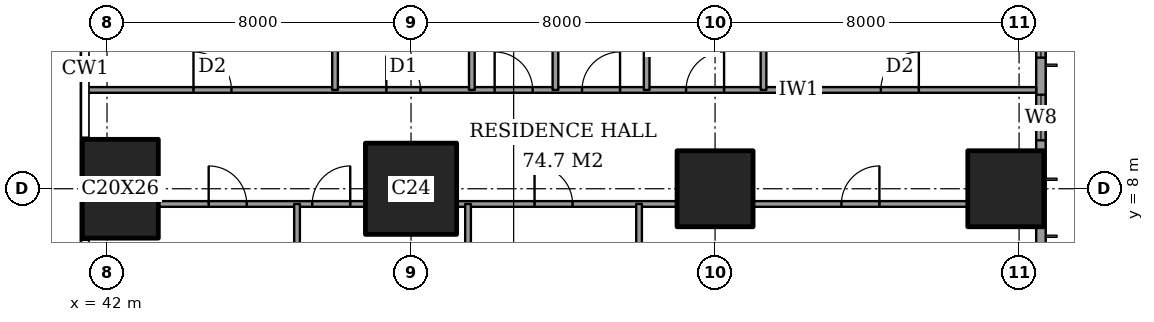
"""IFC4 building model, lengths in metres.
Left out: names, types, materials, properties, quantities, classifications, styles, units other than length and angle.
Written with IfcOpenShell. Run it as: python <this file> out.ifc"""

import sys

from ifc_helpers import new_model, si_unit, direction, frame, frame_2d, origin, origin_2d, place, context, subcontext, project, spatial, rectangle, extrude, element, fill, save


model = new_model("IFC4")
c1 = context("Model", 3, precision=1e-05, world=origin(), true_north=direction((0.0, 1.0)))
c2 = subcontext(c1, "Body", "Model", "MODEL_VIEW")
j1 = project(units=[si_unit("LENGTHUNIT", "METRE"), si_unit("PLANEANGLEUNIT", "RADIAN")], contexts=[c1])
p1 = place(None, origin())
s1 = spatial("IfcSite", under=j1, at=p1, CompositionType="ELEMENT")
p2 = place(p1, origin())
s2 = spatial("IfcBuilding", under=s1, at=p2, CompositionType="ELEMENT")
p3 = place(p2, frame((0.0, 0.0, 44.0)))
s3 = spatial("IfcBuildingStorey", under=s2, at=p3, CompositionType="ELEMENT", Elevation=44.0)
p4 = place(p3, frame((42.35, 8.0, 0.0), z_axis=(0.0, 0.0, 1.0), x_axis=(1.0, 0.0, 0.0)))
e1 = element("IfcColumn", 1, at=p4, inside=s3, PredefinedType="COLUMN", context=c2, shape_type="SweptSolid", body=[
    extrude(rectangle(XDim=2.0, YDim=2.6, at=origin_2d()), origin(), (0.0, 0.0, 1.0), 3.6),
])
p5 = place(p3, frame((50.0, 8.0, 0.0), z_axis=(0.0, 0.0, 1.0), x_axis=(1.0, 0.0, 0.0)))
e2 = element("IfcColumn", 2, at=p5, inside=s3, PredefinedType="COLUMN", context=c2, shape_type="SweptSolid", body=[
    extrude(rectangle(XDim=2.4, YDim=2.4, at=origin_2d()), origin(), (0.0, 0.0, 1.0), 3.6),
])
for number, where, z_axis, x_axis in (
    (3, (58.0, 8.0, 0.0), (0.0, 0.0, 1.0), (1.0, 0.0, 0.0)),
    (4, (65.65, 8.0, 0.0), (0.0, 0.0, 1.0), (1.0, 0.0, 0.0)),
):
    element("IfcColumn", number, at=place(p3, frame(where, z_axis=z_axis, x_axis=x_axis)), inside=s3, PredefinedType="COLUMN", context=c2, shape_type="SweptSolid", body=[
        extrude(rectangle(XDim=2.0, YDim=2.0, at=origin_2d()), origin(), (0.0, 0.0, 1.0), 3.6),
    ])
p6 = place(p3, frame((66.575, 3.175, 0.0), z_axis=(0.0, 0.0, 1.0), x_axis=(0.0, 1.0, 0.0)))
e5 = element("IfcWall", 5, at=p6, inside=s3, PredefinedType="SOLIDWALL", context=c2, shape_type="SweptSolid", body=[
    extrude(rectangle(XDim=41.65, YDim=0.25, at=frame_2d((20.825, 0.0))), origin(), (0.0, 0.0, 1.0), 3.6),
])
p7 = place(p6, frame((0.775, 0.0, 0.6)))
e6 = element("IfcOpeningElement", 6, at=p7, cuts=e5, PredefinedType="OPENING", context=c2, shape_type="SweptSolid", body=[
    extrude(rectangle(XDim=2.4, YDim=2.0, at=frame_2d((1.2, 1.0))), frame((0.0, 0.135, 0.0), z_axis=(0.0, -1.0, 0.0), x_axis=(1.0, 0.0, 0.0)), (0.0, 0.0, 1.0), 0.27),
])
p8 = place(p6, frame((6.1, 0.0, 0.6)))
e7 = element("IfcOpeningElement", 7, at=p8, cuts=e5, PredefinedType="OPENING", context=c2, shape_type="SweptSolid", body=[
    extrude(rectangle(XDim=1.2, YDim=2.0, at=frame_2d((0.6, 1.0))), frame((0.0, 0.135, 0.0), z_axis=(0.0, -1.0, 0.0), x_axis=(1.0, 0.0, 0.0)), (0.0, 0.0, 1.0), 0.27),
])
p9 = place(p6, frame((8.275, 0.0, 0.6)))
e8 = element("IfcOpeningElement", 8, at=p9, cuts=e5, PredefinedType="OPENING", context=c2, shape_type="SweptSolid", body=[
    extrude(rectangle(XDim=2.4, YDim=2.0, at=frame_2d((1.2, 1.0))), frame((0.0, 0.135, 0.0), z_axis=(0.0, -1.0, 0.0), x_axis=(1.0, 0.0, 0.0)), (0.0, 0.0, 1.0), 0.27),
])
p10 = place(p6, frame((15.775, 0.0, 0.6)))
e9 = element("IfcOpeningElement", 9, at=p10, cuts=e5, PredefinedType="OPENING", context=c2, shape_type="SweptSolid", body=[
    extrude(rectangle(XDim=2.4, YDim=2.0, at=frame_2d((1.2, 1.0))), frame((0.0, 0.135, 0.0), z_axis=(0.0, -1.0, 0.0), x_axis=(1.0, 0.0, 0.0)), (0.0, 0.0, 1.0), 0.27),
])
p11 = place(p6, frame((23.475, 0.0, 0.6)))
e10 = element("IfcOpeningElement", 10, at=p11, cuts=e5, PredefinedType="OPENING", context=c2, shape_type="SweptSolid", body=[
    extrude(rectangle(XDim=2.4, YDim=2.0, at=frame_2d((1.2, 1.0))), frame((0.0, 0.135, 0.0), z_axis=(0.0, -1.0, 0.0), x_axis=(1.0, 0.0, 0.0)), (0.0, 0.0, 1.0), 0.27),
])
p12 = place(p6, frame((30.975, 0.0, 0.6)))
e11 = element("IfcOpeningElement", 11, at=p12, cuts=e5, PredefinedType="OPENING", context=c2, shape_type="SweptSolid", body=[
    extrude(rectangle(XDim=2.4, YDim=2.0, at=frame_2d((1.2, 1.0))), frame((0.0, 0.135, 0.0), z_axis=(0.0, -1.0, 0.0), x_axis=(1.0, 0.0, 0.0)), (0.0, 0.0, 1.0), 0.27),
])
p13 = place(p6, frame((34.5, 0.0, 0.6)))
e12 = element("IfcOpeningElement", 12, at=p13, cuts=e5, PredefinedType="OPENING", context=c2, shape_type="SweptSolid", body=[
    extrude(rectangle(XDim=1.2, YDim=2.0, at=frame_2d((0.6, 1.0))), frame((0.0, 0.135, 0.0), z_axis=(0.0, -1.0, 0.0), x_axis=(1.0, 0.0, 0.0)), (0.0, 0.0, 1.0), 0.27),
])
p14 = place(p6, frame((38.475, 0.0, 0.6)))
e13 = element("IfcOpeningElement", 13, at=p14, cuts=e5, PredefinedType="OPENING", context=c2, shape_type="SweptSolid", body=[
    extrude(rectangle(XDim=2.4, YDim=2.0, at=frame_2d((1.2, 1.0))), frame((0.0, 0.135, 0.0), z_axis=(0.0, -1.0, 0.0), x_axis=(1.0, 0.0, 0.0)), (0.0, 0.0, 1.0), 0.27),
])
p15 = place(p3, frame((43.35, 7.6, 0.0), z_axis=(0.0, 0.0, 1.0), x_axis=(1.0, 0.0, 0.0)))
e14 = element("IfcWall", 14, at=p15, inside=s3, PredefinedType="PARTITIONING", context=c2, shape_type="SweptSolid", body=[
    extrude(rectangle(XDim=5.45, YDim=0.15, at=frame_2d((2.725, 0.0))), origin(), (0.0, 0.0, 1.0), 3.35),
])
p16 = place(p15, frame((4.05, 0.0, 0.0)))
e15 = element("IfcOpeningElement", 15, at=p16, cuts=e14, PredefinedType="OPENING", context=c2, shape_type="SweptSolid", body=[
    extrude(rectangle(XDim=1.0, YDim=2.1, at=frame_2d((0.5, 1.05))), frame((0.0, 0.085, 0.0), z_axis=(0.0, -1.0, 0.0), x_axis=(1.0, 0.0, 0.0)), (0.0, 0.0, 1.0), 0.17),
])
p17 = place(p15, frame((1.325, 0.0, 0.0)))
e16 = element("IfcOpeningElement", 16, at=p17, cuts=e14, PredefinedType="OPENING", context=c2, shape_type="SweptSolid", body=[
    extrude(rectangle(XDim=1.0, YDim=2.1, at=frame_2d((0.5, 1.05))), frame((0.0, 0.085, 0.0), z_axis=(0.0, -1.0, 0.0), x_axis=(1.0, 0.0, 0.0)), (0.0, 0.0, 1.0), 0.17),
])
p18 = place(p3, frame((51.2, 7.6, 0.0), z_axis=(0.0, 0.0, 1.0), x_axis=(1.0, 0.0, 0.0)))
e17 = element("IfcWall", 17, at=p18, inside=s3, PredefinedType="PARTITIONING", context=c2, shape_type="SweptSolid", body=[
    extrude(rectangle(XDim=5.8, YDim=0.15, at=frame_2d((2.9, 0.0))), origin(), (0.0, 0.0, 1.0), 3.35),
])
p19 = place(p18, frame((2.05, 0.0, 0.0)))
e18 = element("IfcOpeningElement", 18, at=p19, cuts=e17, PredefinedType="OPENING", context=c2, shape_type="SweptSolid", body=[
    extrude(rectangle(XDim=1.0, YDim=2.1, at=frame_2d((0.5, 1.05))), frame((0.0, 0.085, 0.0), z_axis=(0.0, -1.0, 0.0), x_axis=(1.0, 0.0, 0.0)), (0.0, 0.0, 1.0), 0.17),
])
p20 = place(p3, frame((59.0, 7.6, 0.0), z_axis=(0.0, 0.0, 1.0), x_axis=(1.0, 0.0, 0.0)))
e19 = element("IfcWall", 19, at=p20, inside=s3, PredefinedType="PARTITIONING", context=c2, shape_type="SweptSolid", body=[
    extrude(rectangle(XDim=5.65, YDim=0.15, at=frame_2d((2.825, 0.0))), origin(), (0.0, 0.0, 1.0), 3.35),
])
p21 = place(p20, frame((2.325, 0.0, 0.0)))
e20 = element("IfcOpeningElement", 20, at=p21, cuts=e19, PredefinedType="OPENING", context=c2, shape_type="SweptSolid", body=[
    extrude(rectangle(XDim=1.0, YDim=2.1, at=frame_2d((0.5, 1.05))), frame((0.0, 0.085, 0.0), z_axis=(0.0, -1.0, 0.0), x_axis=(1.0, 0.0, 0.0)), (0.0, 0.0, 1.0), 0.17),
])
p22 = place(p3, frame((41.439, 10.6, 0.0), z_axis=(0.0, 0.0, 1.0), x_axis=(1.0, 0.0, 0.0)))
e21 = element("IfcWall", 21, at=p22, inside=s3, PredefinedType="PARTITIONING", context=c2, shape_type="SweptSolid", body=[
    extrude(rectangle(XDim=25.011, YDim=0.15, at=frame_2d((12.505, 0.0))), origin(), (0.0, 0.0, 1.0), 3.35),
])
p23 = place(p22, frame((10.761, 0.0, 0.0)))
e22 = element("IfcOpeningElement", 22, at=p23, cuts=e21, PredefinedType="OPENING", context=c2, shape_type="SweptSolid", body=[
    extrude(rectangle(XDim=1.0, YDim=2.1, at=frame_2d((0.5, 1.05))), frame((0.0, 0.085, 0.0), z_axis=(0.0, -1.0, 0.0), x_axis=(1.0, 0.0, 0.0)), (0.0, 0.0, 1.0), 0.17),
])
p24 = place(p22, frame((20.924, 0.0, 0.0)))
e23 = element("IfcOpeningElement", 23, at=p24, cuts=e21, PredefinedType="OPENING", context=c2, shape_type="SweptSolid", body=[
    extrude(rectangle(XDim=1.0, YDim=2.1, at=frame_2d((0.5, 1.05))), frame((0.0, 0.085, 0.0), z_axis=(0.0, -1.0, 0.0), x_axis=(1.0, 0.0, 0.0)), (0.0, 0.0, 1.0), 0.17),
])
p25 = place(p22, frame((15.799, 0.0, 0.0)))
e24 = element("IfcOpeningElement", 24, at=p25, cuts=e21, PredefinedType="OPENING", context=c2, shape_type="SweptSolid", body=[
    extrude(rectangle(XDim=1.0, YDim=2.1, at=frame_2d((0.5, 1.05))), frame((0.0, 0.085, 0.0), z_axis=(0.0, -1.0, 0.0), x_axis=(1.0, 0.0, 0.0)), (0.0, 0.0, 1.0), 0.17),
])
p26 = place(p22, frame((13.061, 0.0, 0.0)))
e25 = element("IfcOpeningElement", 25, at=p26, cuts=e21, PredefinedType="OPENING", context=c2, shape_type="SweptSolid", body=[
    extrude(rectangle(XDim=1.0, YDim=2.1, at=frame_2d((0.5, 1.05))), frame((0.0, 0.085, 0.0), z_axis=(0.0, -1.0, 0.0), x_axis=(1.0, 0.0, 0.0)), (0.0, 0.0, 1.0), 0.17),
])
p27 = place(p22, frame((7.911, 0.0, 0.0)))
e26 = element("IfcOpeningElement", 26, at=p27, cuts=e21, PredefinedType="OPENING", context=c2, shape_type="SweptSolid", body=[
    extrude(rectangle(XDim=0.9, YDim=2.1, at=frame_2d((0.45, 1.05))), frame((0.0, 0.085, 0.0), z_axis=(0.0, -1.0, 0.0), x_axis=(1.0, 0.0, 0.0)), (0.0, 0.0, 1.0), 0.17),
])
p28 = place(p22, frame((2.836, 0.0, 0.0)))
e27 = element("IfcOpeningElement", 27, at=p28, cuts=e21, PredefinedType="OPENING", context=c2, shape_type="SweptSolid", body=[
    extrude(rectangle(XDim=1.0, YDim=2.1, at=frame_2d((0.5, 1.05))), frame((0.0, 0.085, 0.0), z_axis=(0.0, -1.0, 0.0), x_axis=(1.0, 0.0, 0.0)), (0.0, 0.0, 1.0), 0.17),
])
p29 = place(p3, frame((47.0, -0.45, 0.0), z_axis=(0.0, 0.0, 1.0), x_axis=(0.0, 1.0, 0.0)))
e28 = element("IfcWall", 28, at=p29, inside=s3, PredefinedType="PARTITIONING", context=c2, shape_type="SweptSolid", body=[
    extrude(rectangle(XDim=8.05, YDim=0.15, at=frame_2d((4.025, 0.0))), origin(), (0.0, 0.0, 1.0), 3.35),
])
p30 = place(p3, frame((48.0, 10.6, 0.0), z_axis=(0.0, 0.0, 1.0), x_axis=(0.0, 1.0, 0.0)))
e29 = element("IfcWall", 29, at=p30, inside=s3, PredefinedType="PARTITIONING", context=c2, shape_type="SweptSolid", body=[
    extrude(rectangle(XDim=13.4, YDim=0.15, at=frame_2d((6.7, 0.0))), origin(), (0.0, 0.0, 1.0), 3.35),
])
p31 = place(p30, frame((10.8, 0.0, 0.0)))
e30 = element("IfcOpeningElement", 30, at=p31, cuts=e29, PredefinedType="OPENING", context=c2, shape_type="SweptSolid", body=[
    extrude(rectangle(XDim=1.2, YDim=2.4, at=frame_2d((0.6, 1.2))), frame((0.0, 0.085, 0.0), z_axis=(0.0, -1.0, 0.0), x_axis=(1.0, 0.0, 0.0)), (0.0, 0.0, 1.0), 0.17),
])
p32 = place(p30, frame((6.7, 0.0, 0.0)))
e31 = element("IfcOpeningElement", 31, at=p32, cuts=e29, PredefinedType="OPENING", context=c2, shape_type="SweptSolid", body=[
    extrude(rectangle(XDim=0.9, YDim=2.1, at=frame_2d((0.45, 1.05))), frame((0.0, 0.085, 0.0), z_axis=(0.0, -1.0, 0.0), x_axis=(1.0, 0.0, 0.0)), (0.0, 0.0, 1.0), 0.17),
])
p33 = place(p3, frame((51.5, -0.45, 0.0), z_axis=(0.0, 0.0, 1.0), x_axis=(0.0, 1.0, 0.0)))
e32 = element("IfcWall", 32, at=p33, inside=s3, PredefinedType="PARTITIONING", context=c2, shape_type="SweptSolid", body=[
    extrude(rectangle(XDim=8.05, YDim=0.15, at=frame_2d((4.025, 0.0))), origin(), (0.0, 0.0, 1.0), 3.35),
])
for number, where, z_axis, x_axis in (
    (33, (51.6, 10.6, 0.0), (0.0, 0.0, 1.0), (0.0, 1.0, 0.0)),
    (34, (53.8, 10.6, 0.0), (0.0, 0.0, 1.0), (0.0, 1.0, 0.0)),
):
    element("IfcWall", number, at=place(p3, frame(where, z_axis=z_axis, x_axis=x_axis)), inside=s3, PredefinedType="PARTITIONING", context=c2, shape_type="SweptSolid", body=[
        extrude(rectangle(XDim=4.0, YDim=0.15, at=frame_2d((2.0, 0.0))), origin(), (0.0, 0.0, 1.0), 3.35),
    ])
p34 = place(p3, frame((56.0, -0.45, 0.0), z_axis=(0.0, 0.0, 1.0), x_axis=(0.0, 1.0, 0.0)))
e35 = element("IfcWall", 35, at=p34, inside=s3, PredefinedType="PARTITIONING", context=c2, shape_type="SweptSolid", body=[
    extrude(rectangle(XDim=8.05, YDim=0.15, at=frame_2d((4.025, 0.0))), origin(), (0.0, 0.0, 1.0), 3.35),
])
p35 = place(p3, frame((56.2, 10.6, 0.0), z_axis=(0.0, 0.0, 1.0), x_axis=(0.0, 1.0, 0.0)))
e36 = element("IfcWall", 36, at=p35, inside=s3, PredefinedType="PARTITIONING", context=c2, shape_type="SweptSolid", body=[
    extrude(rectangle(XDim=11.0, YDim=0.15, at=frame_2d((5.5, 0.0))), origin(), (0.0, 0.0, 1.0), 3.35),
])
p36 = place(p35, frame((7.0, 0.0, 0.0)))
e37 = element("IfcOpeningElement", 37, at=p36, cuts=e36, PredefinedType="OPENING", context=c2, shape_type="SweptSolid", body=[
    extrude(rectangle(XDim=1.0, YDim=2.1, at=frame_2d((0.5, 1.05))), frame((0.0, 0.085, 0.0), z_axis=(0.0, -1.0, 0.0), x_axis=(1.0, 0.0, 0.0)), (0.0, 0.0, 1.0), 0.17),
])
p37 = place(p3, frame((59.275, 10.6, 0.0), z_axis=(0.0, 0.0, 1.0), x_axis=(0.0, 1.0, 0.0)))
e38 = element("IfcWall", 38, at=p37, inside=s3, PredefinedType="PARTITIONING", context=c2, shape_type="SweptSolid", body=[
    extrude(rectangle(XDim=4.2, YDim=0.15, at=frame_2d((2.1, 0.0))), origin(), (0.0, 0.0, 1.0), 3.35),
])
p38 = place(p8, origin())
e39 = element("IfcWindow", 39, at=p38, inside=s3, PartitioningType="SINGLE_PANEL", PredefinedType="WINDOW", context=c2, shape_type="SweptSolid", body=[
    extrude(rectangle(XDim=1.2, YDim=2.0, at=frame_2d((0.6, 1.0))), frame((0.0, 0.03, 0.0), z_axis=(0.0, -1.0, 0.0), x_axis=(1.0, 0.0, 0.0)), (0.0, 0.0, 1.0), 0.06),
])
fill(e7, e39)
p39 = place(p9, origin())
e40 = element("IfcWindow", 40, at=p39, inside=s3, PartitioningType="SINGLE_PANEL", PredefinedType="WINDOW", context=c2, shape_type="SweptSolid", body=[
    extrude(rectangle(XDim=2.4, YDim=2.0, at=frame_2d((1.2, 1.0))), frame((0.0, 0.03, 0.0), z_axis=(0.0, -1.0, 0.0), x_axis=(1.0, 0.0, 0.0)), (0.0, 0.0, 1.0), 0.06),
])
fill(e8, e40)
p40 = place(p21, origin())
e41 = element("IfcDoor", 41, at=p40, inside=s3, OperationType="SINGLE_SWING_LEFT", PredefinedType="DOOR", context=c2, shape_type="SweptSolid", body=[
    extrude(rectangle(XDim=1.0, YDim=2.1, at=frame_2d((0.5, 1.05))), frame((0.0, 0.025, 0.0), z_axis=(0.0, -1.0, 0.0), x_axis=(1.0, 0.0, 0.0)), (0.0, 0.0, 1.0), 0.05),
])
fill(e20, e41)
p41 = place(p19, origin())
e42 = element("IfcDoor", 42, at=p41, inside=s3, OperationType="SINGLE_SWING_RIGHT", PredefinedType="DOOR", context=c2, shape_type="SweptSolid", body=[
    extrude(rectangle(XDim=1.0, YDim=2.1, at=frame_2d((0.5, 1.05))), frame((0.0, 0.025, 0.0), z_axis=(0.0, -1.0, 0.0), x_axis=(1.0, 0.0, 0.0)), (0.0, 0.0, 1.0), 0.05),
])
fill(e18, e42)
p42 = place(p16, origin())
e43 = element("IfcDoor", 43, at=p42, inside=s3, OperationType="SINGLE_SWING_LEFT", PredefinedType="DOOR", context=c2, shape_type="SweptSolid", body=[
    extrude(rectangle(XDim=1.0, YDim=2.1, at=frame_2d((0.5, 1.05))), frame((0.0, 0.025, 0.0), z_axis=(0.0, -1.0, 0.0), x_axis=(1.0, 0.0, 0.0)), (0.0, 0.0, 1.0), 0.05),
])
fill(e15, e43)
p43 = place(p17, origin())
e44 = element("IfcDoor", 44, at=p43, inside=s3, OperationType="SINGLE_SWING_RIGHT", PredefinedType="DOOR", context=c2, shape_type="SweptSolid", body=[
    extrude(rectangle(XDim=1.0, YDim=2.1, at=frame_2d((0.5, 1.05))), frame((0.0, 0.025, 0.0), z_axis=(0.0, -1.0, 0.0), x_axis=(1.0, 0.0, 0.0)), (0.0, 0.0, 1.0), 0.05),
])
fill(e16, e44)
p44 = place(p23, origin())
e45 = element("IfcDoor", 45, at=p44, inside=s3, OperationType="SINGLE_SWING_RIGHT", PredefinedType="DOOR", context=c2, shape_type="SweptSolid", body=[
    extrude(rectangle(XDim=1.0, YDim=2.1, at=frame_2d((0.5, 1.05))), frame((0.0, 0.025, 0.0), z_axis=(0.0, -1.0, 0.0), x_axis=(1.0, 0.0, 0.0)), (0.0, 0.0, 1.0), 0.05),
])
fill(e22, e45)
p45 = place(p24, origin())
e46 = element("IfcDoor", 46, at=p45, inside=s3, OperationType="SINGLE_SWING_LEFT", PredefinedType="DOOR", context=c2, shape_type="SweptSolid", body=[
    extrude(rectangle(XDim=1.0, YDim=2.1, at=frame_2d((0.5, 1.05))), frame((0.0, 0.025, 0.0), z_axis=(0.0, -1.0, 0.0), x_axis=(1.0, 0.0, 0.0)), (0.0, 0.0, 1.0), 0.05),
])
fill(e23, e46)
p46 = place(p25, origin())
e47 = element("IfcDoor", 47, at=p46, inside=s3, OperationType="SINGLE_SWING_LEFT", PredefinedType="DOOR", context=c2, shape_type="SweptSolid", body=[
    extrude(rectangle(XDim=1.0, YDim=2.1, at=frame_2d((0.5, 1.05))), frame((0.0, 0.025, 0.0), z_axis=(0.0, -1.0, 0.0), x_axis=(1.0, 0.0, 0.0)), (0.0, 0.0, 1.0), 0.05),
])
fill(e24, e47)
p47 = place(p26, origin())
e48 = element("IfcDoor", 48, at=p47, inside=s3, OperationType="SINGLE_SWING_LEFT", PredefinedType="DOOR", context=c2, shape_type="SweptSolid", body=[
    extrude(rectangle(XDim=1.0, YDim=2.1, at=frame_2d((0.5, 1.05))), frame((0.0, 0.025, 0.0), z_axis=(0.0, -1.0, 0.0), x_axis=(1.0, 0.0, 0.0)), (0.0, 0.0, 1.0), 0.05),
])
fill(e25, e48)
p48 = place(p27, origin())
e49 = element("IfcDoor", 49, at=p48, inside=s3, OperationType="SINGLE_SWING_RIGHT", PredefinedType="DOOR", context=c2, shape_type="SweptSolid", body=[
    extrude(rectangle(XDim=0.9, YDim=2.1, at=frame_2d((0.45, 1.05))), frame((0.0, 0.025, 0.0), z_axis=(0.0, -1.0, 0.0), x_axis=(1.0, 0.0, 0.0)), (0.0, 0.0, 1.0), 0.05),
])
fill(e26, e49)
p49 = place(p28, origin())
e50 = element("IfcDoor", 50, at=p49, inside=s3, OperationType="SINGLE_SWING_RIGHT", PredefinedType="DOOR", context=c2, shape_type="SweptSolid", body=[
    extrude(rectangle(XDim=1.0, YDim=2.1, at=frame_2d((0.5, 1.05))), frame((0.0, 0.025, 0.0), z_axis=(0.0, -1.0, 0.0), x_axis=(1.0, 0.0, 0.0)), (0.0, 0.0, 1.0), 0.05),
])
fill(e27, e50)
save(model, sys.argv[1])
